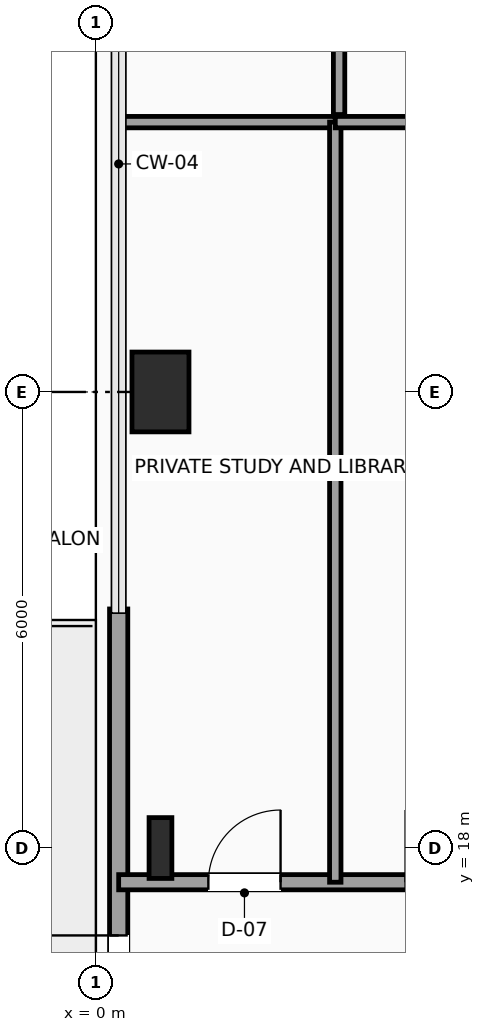
"""IFC4 building model, lengths in metres.
Left out: names, types, materials, properties, quantities, classifications, styles, units other than length and angle.
Written with IfcOpenShell. Run it as: python <this file> out.ifc"""

import sys

from ifc_helpers import new_model, si_unit, direction, frame, frame_2d, origin, origin_2d, place, context, subcontext, project, spatial, rectangle, i_section, extrude, element, fill, save


model = new_model("IFC4")
c1 = context("Model", 3, precision=1e-05, world=origin(), true_north=direction((0.0, 1.0)))
c2 = subcontext(c1, "Body", "Model", "MODEL_VIEW")
j1 = project(units=[si_unit("LENGTHUNIT", "METRE"), si_unit("PLANEANGLEUNIT", "RADIAN")], contexts=[c1])
p1 = place(None, origin())
s1 = spatial("IfcSite", under=j1, at=p1, CompositionType="ELEMENT")
p2 = place(p1, origin())
s2 = spatial("IfcBuilding", under=s1, at=p2, CompositionType="ELEMENT")
p3 = place(p2, frame((0.0, 0.0, 223.65)))
s3 = spatial("IfcBuildingStorey", under=s2, at=p3, CompositionType="ELEMENT", Elevation=223.65)
p4 = place(p3, frame((0.85, 18.0, 0.0), z_axis=(0.0, 0.0, 1.0), x_axis=(1.0, 0.0, 0.0)))
e1 = element("IfcColumn", 1, at=p4, inside=s3, PredefinedType="COLUMN", context=c2, shape_type="SweptSolid", body=[
    extrude(i_section(OverallWidth=0.3, OverallDepth=0.8, WebThickness=0.018, FlangeThickness=0.033, FilletRadius=0.03, at=origin_2d()), origin(), (0.0, 0.0, 1.0), 3.75),
])
p5 = place(p3, frame((0.85, 24.0, 0.0), z_axis=(0.0, 0.0, 1.0), x_axis=(1.0, 0.0, 0.0)))
e2 = element("IfcColumn", 2, at=p5, inside=s3, PredefinedType="COLUMN", context=c2, shape_type="SweptSolid", body=[
    extrude(rectangle(XDim=0.75, YDim=1.05, at=origin_2d()), origin(), (0.0, 0.0, 1.0), 3.75),
])
p6 = place(p3, frame((0.3, 11.855, 0.0), z_axis=(0.0, 0.0, 1.0), x_axis=(0.0, 1.0, 0.0)))
e3 = element("IfcWall", 3, at=p6, inside=s3, PredefinedType="SOLIDWALL", context=c2, shape_type="SweptSolid", body=[
    extrude(rectangle(XDim=9.29, YDim=0.24, at=frame_2d((4.645, 0.0))), origin(), (0.0, 0.0, 1.0), 3.54),
])
p7 = place(p6, frame((3.945, 0.0, 0.0)))
e4 = element("IfcOpeningElement", 4, at=p7, cuts=e3, PredefinedType="OPENING", context=c2, shape_type="SweptSolid", body=[
    extrude(rectangle(XDim=1.05, YDim=2.2, at=frame_2d((0.525, 1.1))), frame((0.0, 0.13, 0.0), z_axis=(0.0, -1.0, 0.0), x_axis=(1.0, 0.0, 0.0)), (0.0, 0.0, 1.0), 0.26),
])
p8 = place(p3, frame((0.3, 17.55, 0.0), z_axis=(0.0, 0.0, 1.0), x_axis=(1.0, 0.0, 0.0)))
e5 = element("IfcWall", 5, at=p8, inside=s3, PredefinedType="SOLIDWALL", context=c2, shape_type="SweptSolid", body=[
    extrude(rectangle(XDim=12.3, YDim=0.2, at=frame_2d((6.15, 0.0))), origin(), (0.0, 0.0, 1.0), 3.54),
])
p9 = place(p8, frame((1.18, 0.0, 0.0)))
e6 = element("IfcOpeningElement", 6, at=p9, cuts=e5, PredefinedType="OPENING", context=c2, shape_type="SweptSolid", body=[
    extrude(rectangle(XDim=0.95, YDim=2.15, at=frame_2d((0.475, 1.075))), frame((0.0, 0.11, 0.0), z_axis=(0.0, -1.0, 0.0), x_axis=(1.0, 0.0, 0.0)), (0.0, 0.0, 1.0), 0.22),
])
p10 = place(p8, frame((3.775, 0.0, 0.0)))
e7 = element("IfcOpeningElement", 7, at=p10, cuts=e5, PredefinedType="OPENING", context=c2, shape_type="SweptSolid", body=[
    extrude(rectangle(XDim=0.95, YDim=2.15, at=frame_2d((0.475, 1.075))), frame((0.0, 0.11, 0.0), z_axis=(0.0, -1.0, 0.0), x_axis=(1.0, 0.0, 0.0)), (0.0, 0.0, 1.0), 0.22),
])
p11 = place(p3, frame((0.3, 27.55, 0.0), z_axis=(0.0, 0.0, 1.0), x_axis=(1.0, 0.0, 0.0)))
e8 = element("IfcWall", 8, at=p11, inside=s3, PredefinedType="PARTITIONING", context=c2, shape_type="SweptSolid", body=[
    extrude(rectangle(XDim=2.85, YDim=0.15, at=frame_2d((1.425, 0.0))), origin(), (0.0, 0.0, 1.0), 3.54),
])
p12 = place(p3, frame((3.15, 17.55, 0.0), z_axis=(0.0, 0.0, 1.0), x_axis=(0.0, 1.0, 0.0)))
e9 = element("IfcWall", 9, at=p12, inside=s3, PredefinedType="PARTITIONING", context=c2, shape_type="SweptSolid", body=[
    extrude(rectangle(XDim=10.0, YDim=0.15, at=frame_2d((5.0, 0.0))), origin(), (0.0, 0.0, 1.0), 3.54),
])
p13 = place(p3, frame((3.15, 27.55, 0.0), z_axis=(0.0, 0.0, 1.0), x_axis=(1.0, 0.0, 0.0)))
e10 = element("IfcWall", 10, at=p13, inside=s3, PredefinedType="PARTITIONING", context=c2, shape_type="SweptSolid", body=[
    extrude(rectangle(XDim=2.8, YDim=0.15, at=frame_2d((1.4, 0.0))), origin(), (0.0, 0.0, 1.0), 3.54),
])
p14 = place(p3, frame((3.2, 27.65, 0.0), z_axis=(0.0, 0.0, 1.0), x_axis=(0.0, 1.0, 0.0)))
e11 = element("IfcWall", 11, at=p14, inside=s3, PredefinedType="PARTITIONING", context=c2, shape_type="SweptSolid", body=[
    extrude(rectangle(XDim=3.55, YDim=0.15, at=frame_2d((1.775, 0.0))), origin(), (0.0, 0.0, 1.0), 3.54),
])
p15 = place(p7, origin())
e12 = element("IfcDoor", 12, at=p15, inside=s3, OperationType="SINGLE_SWING_RIGHT", PredefinedType="DOOR", context=c2, shape_type="SweptSolid", body=[
    extrude(rectangle(XDim=1.05, YDim=2.2, at=frame_2d((0.525, 1.1))), frame((0.0, 0.025, 0.0), z_axis=(0.0, -1.0, 0.0), x_axis=(1.0, 0.0, 0.0)), (0.0, 0.0, 1.0), 0.05),
])
fill(e4, e12)
p16 = place(p9, origin())
e13 = element("IfcDoor", 13, at=p16, inside=s3, OperationType="SINGLE_SWING_RIGHT", PredefinedType="DOOR", context=c2, shape_type="SweptSolid", body=[
    extrude(rectangle(XDim=0.95, YDim=2.15, at=frame_2d((0.475, 1.075))), frame((0.0, 0.025, 0.0), z_axis=(0.0, -1.0, 0.0), x_axis=(1.0, 0.0, 0.0)), (0.0, 0.0, 1.0), 0.05),
])
fill(e6, e13)
save(model, sys.argv[1])
